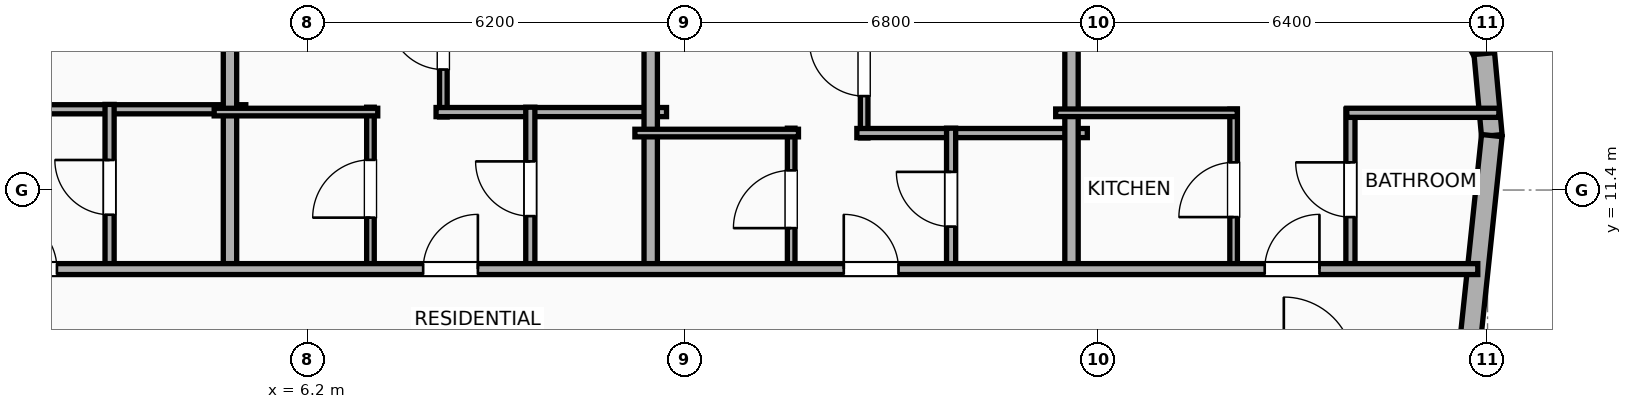
"""IFC4 building model, lengths in metres.
Left out: names, types, materials, properties, quantities, classifications, styles, units other than length and angle.
Written with IfcOpenShell. Run it as: python <this file> out.ifc"""

import sys

from ifc_helpers import new_model, si_unit, direction, frame, frame_2d, origin, place, context, subcontext, project, spatial, rectangle, extrude, element, fill, save


model = new_model("IFC4")
c1 = context("Model", 3, precision=1e-05, world=origin(), true_north=direction((0.0, 1.0)))
c2 = subcontext(c1, "Body", "Model", "MODEL_VIEW")
j1 = project(units=[si_unit("LENGTHUNIT", "METRE"), si_unit("PLANEANGLEUNIT", "RADIAN")], contexts=[c1])
p1 = place(None, origin())
s1 = spatial("IfcSite", under=j1, at=p1, CompositionType="ELEMENT")
p2 = place(p1, origin())
s2 = spatial("IfcBuilding", under=s1, at=p2, CompositionType="ELEMENT")
p3 = place(p2, frame((0.0, 0.0, 271.7)))
s3 = spatial("IfcBuildingStorey", under=s2, at=p3, CompositionType="ELEMENT", Elevation=271.7)
p4 = place(p3, frame((24.924, 14.827, 0.0), z_axis=(0.0, 0.0, 1.0), x_axis=(0.46567116636, -0.884957832228, 0.0)))
e1 = element("IfcWall", 1, at=p4, inside=s3, PredefinedType="ELEMENTEDWALL", context=c2, shape_type="SweptSolid", body=[
    extrude(rectangle(XDim=1.337, YDim=0.34, at=frame_2d((0.668, 0.0))), origin(), (0.0, 0.0, 1.0), 3.65),
])
p5 = place(p3, frame((25.546, 13.644, 0.0), z_axis=(0.0, 0.0, 1.0), x_axis=(0.091592370975, -0.995796584438, 0.0)))
e2 = element("IfcWall", 2, at=p5, inside=s3, PredefinedType="ELEMENTEDWALL", context=c2, shape_type="SweptSolid", body=[
    extrude(rectangle(XDim=1.354, YDim=0.34, at=frame_2d((0.677, 0.0))), origin(), (0.0, 0.0, 1.0), 3.65),
])
p6 = place(p3, frame((25.67, 12.296, 0.0), z_axis=(0.0, 0.0, 1.0), x_axis=(-0.104533282919, -0.994521388791, 0.0)))
e3 = element("IfcWall", 3, at=p6, inside=s3, PredefinedType="ELEMENTEDWALL", context=c2, shape_type="SweptSolid", body=[
    extrude(rectangle(XDim=30.366, YDim=0.34, at=frame_2d((15.183, 0.0))), origin(), (0.0, 0.0, 1.0), 3.65),
])
p7 = place(p6, frame((5.842, 0.0, 0.75)))
e4 = element("IfcOpeningElement", 4, at=p7, cuts=e3, PredefinedType="OPENING", context=c2, shape_type="SweptSolid", body=[
    extrude(rectangle(XDim=1.8, YDim=2.1, at=frame_2d((0.9, 1.05))), frame((0.0, 0.18, 0.0), z_axis=(0.0, -1.0, 0.0), x_axis=(1.0, 0.0, 0.0)), (0.0, 0.0, 1.0), 0.36),
])
p8 = place(p6, frame((23.525, 0.0, 0.75)))
e5 = element("IfcOpeningElement", 5, at=p8, cuts=e3, PredefinedType="OPENING", context=c2, shape_type="SweptSolid", body=[
    extrude(rectangle(XDim=1.8, YDim=2.1, at=frame_2d((0.9, 1.05))), frame((0.0, 0.18, 0.0), z_axis=(0.0, -1.0, 0.0), x_axis=(1.0, 0.0, 0.0)), (0.0, 0.0, 1.0), 0.36),
])
p9 = place(p6, frame((27.017, 0.0, 0.75)))
e6 = element("IfcOpeningElement", 6, at=p9, cuts=e3, PredefinedType="OPENING", context=c2, shape_type="SweptSolid", body=[
    extrude(rectangle(XDim=1.2, YDim=2.05, at=frame_2d((0.6, 1.025))), frame((0.0, 0.18, 0.0), z_axis=(0.0, -1.0, 0.0), x_axis=(1.0, 0.0, 0.0)), (0.0, 0.0, 1.0), 0.36),
])
p10 = place(p6, frame((17.829, 0.0, 0.75)))
e7 = element("IfcOpeningElement", 7, at=p10, cuts=e3, PredefinedType="OPENING", context=c2, shape_type="SweptSolid", body=[
    extrude(rectangle(XDim=1.2, YDim=2.05, at=frame_2d((0.6, 1.025))), frame((0.0, 0.18, 0.0), z_axis=(0.0, -1.0, 0.0), x_axis=(1.0, 0.0, 0.0)), (0.0, 0.0, 1.0), 0.36),
])
p11 = place(p3, frame((1.389, 12.728, 0.0), z_axis=(0.0, 0.0, 1.0), x_axis=(1.0, 0.0, 0.0)))
e8 = element("IfcWall", 8, at=p11, inside=s3, PredefinedType="PLUMBINGWALL", context=c2, shape_type="SweptSolid", body=[
    extrude(rectangle(XDim=3.79, YDim=0.15, at=frame_2d((1.895, 0.0))), origin(), (0.0, 0.0, 1.0), 3.65),
])
p12 = place(p3, frame((2.939, 10.08, 0.0), z_axis=(0.0, 0.0, 1.0), x_axis=(0.0, 1.0, 0.0)))
e9 = element("IfcWall", 9, at=p12, inside=s3, PredefinedType="PLUMBINGWALL", context=c2, shape_type="SweptSolid", body=[
    extrude(rectangle(XDim=2.728, YDim=0.15, at=frame_2d((1.364, 0.0))), origin(), (0.0, 0.0, 1.0), 3.65),
])
p13 = place(p12, frame((0.914, 0.0, 0.0)))
e10 = element("IfcOpeningElement", 10, at=p13, cuts=e9, PredefinedType="OPENING", context=c2, shape_type="SweptSolid", body=[
    extrude(rectangle(XDim=0.9, YDim=2.05, at=frame_2d((0.45, 1.025))), frame((0.0, 0.085, 0.0), z_axis=(0.0, -1.0, 0.0), x_axis=(1.0, 0.0, 0.0)), (0.0, 0.0, 1.0), 0.17),
])
p14 = place(p3, frame((4.919, 10.02, 0.0), z_axis=(0.0, 0.0, 1.0), x_axis=(0.0, 1.0, 0.0)))
e11 = element("IfcWall", 11, at=p14, inside=s3, PredefinedType="PARTITIONING", context=c2, shape_type="SweptSolid", body=[
    extrude(rectangle(XDim=7.922, YDim=0.22, at=frame_2d((3.961, 0.0))), origin(), (0.0, 0.0, 1.0), 3.65),
])
p15 = place(p3, frame((8.428, 12.602, 0.0), z_axis=(0.0, 0.0, 1.0), x_axis=(0.0, 1.0, 0.0)))
e12 = element("IfcWall", 12, at=p15, inside=s3, PredefinedType="PARTITIONING", context=c2, shape_type="SweptSolid", body=[
    extrude(rectangle(XDim=5.122, YDim=0.125, at=frame_2d((2.561, 0.0))), origin(), (0.0, 0.0, 1.0), 3.65),
])
p16 = place(p15, frame((0.779, 0.0, 0.0)))
e13 = element("IfcOpeningElement", 13, at=p16, cuts=e12, PredefinedType="OPENING", context=c2, shape_type="SweptSolid", body=[
    extrude(rectangle(XDim=0.9, YDim=2.05, at=frame_2d((0.45, 1.025))), frame((0.0, 0.073, 0.0), z_axis=(0.0, -1.0, 0.0), x_axis=(1.0, 0.0, 0.0)), (0.0, 0.0, 1.0), 0.145),
])
p17 = place(p3, frame((8.308, 12.682, 0.0), z_axis=(0.0, 0.0, 1.0), x_axis=(1.0, 0.0, 0.0)))
e14 = element("IfcWall", 14, at=p17, inside=s3, PredefinedType="PLUMBINGWALL", context=c2, shape_type="SweptSolid", body=[
    extrude(rectangle(XDim=3.79, YDim=0.15, at=frame_2d((1.895, 0.0))), origin(), (0.0, 0.0, 1.0), 3.65),
])
p18 = place(p3, frame((7.229, 10.08, 0.0), z_axis=(0.0, 0.0, 1.0), x_axis=(0.0, 1.0, 0.0)))
e15 = element("IfcWall", 15, at=p18, inside=s3, PredefinedType="PARTITIONING", context=c2, shape_type="SweptSolid", body=[
    extrude(rectangle(XDim=2.682, YDim=0.125, at=frame_2d((1.341, 0.0))), origin(), (0.0, 0.0, 1.0), 3.65),
])
p19 = place(p18, frame((0.866, 0.0, 0.0)))
e16 = element("IfcOpeningElement", 16, at=p19, cuts=e15, PredefinedType="OPENING", context=c2, shape_type="SweptSolid", body=[
    extrude(rectangle(XDim=0.95, YDim=2.05, at=frame_2d((0.475, 1.025))), frame((0.0, 0.073, 0.0), z_axis=(0.0, -1.0, 0.0), x_axis=(1.0, 0.0, 0.0)), (0.0, 0.0, 1.0), 0.145),
])
p20 = place(p3, frame((4.659, 12.682, 0.0), z_axis=(0.0, 0.0, 1.0), x_axis=(1.0, 0.0, 0.0)))
e17 = element("IfcWall", 17, at=p20, inside=s3, PredefinedType="PARTITIONING", context=c2, shape_type="SweptSolid", body=[
    extrude(rectangle(XDim=2.69, YDim=0.125, at=frame_2d((1.345, 0.0))), origin(), (0.0, 0.0, 1.0), 3.65),
])
p21 = place(p3, frame((9.858, 10.08, 0.0), z_axis=(0.0, 0.0, 1.0), x_axis=(0.0, 1.0, 0.0)))
e18 = element("IfcWall", 18, at=p21, inside=s3, PredefinedType="PLUMBINGWALL", context=c2, shape_type="SweptSolid", body=[
    extrude(rectangle(XDim=2.682, YDim=0.15, at=frame_2d((1.341, 0.0))), origin(), (0.0, 0.0, 1.0), 3.65),
])
p22 = place(p21, frame((0.891, 0.0, 0.0)))
e19 = element("IfcOpeningElement", 19, at=p22, cuts=e18, PredefinedType="OPENING", context=c2, shape_type="SweptSolid", body=[
    extrude(rectangle(XDim=0.9, YDim=2.05, at=frame_2d((0.45, 1.025))), frame((0.0, 0.085, 0.0), z_axis=(0.0, -1.0, 0.0), x_axis=(1.0, 0.0, 0.0)), (0.0, 0.0, 1.0), 0.17),
])
p23 = place(p3, frame((11.838, 10.02, 0.0), z_axis=(0.0, 0.0, 1.0), x_axis=(0.0, 1.0, 0.0)))
e20 = element("IfcWall", 20, at=p23, inside=s3, PredefinedType="PARTITIONING", context=c2, shape_type="SweptSolid", body=[
    extrude(rectangle(XDim=7.195, YDim=0.22, at=frame_2d((3.598, 0.0))), origin(), (0.0, 0.0, 1.0), 3.65),
])
p24 = place(p3, frame((15.348, 12.257, 0.0), z_axis=(0.0, 0.0, 1.0), x_axis=(0.0, 1.0, 0.0)))
e21 = element("IfcWall", 21, at=p24, inside=s3, PredefinedType="PARTITIONING", context=c2, shape_type="SweptSolid", body=[
    extrude(rectangle(XDim=4.74, YDim=0.125, at=frame_2d((2.37, 0.0))), origin(), (0.0, 0.0, 1.0), 3.65),
])
p25 = place(p24, frame((0.688, 0.0, 0.0)))
e22 = element("IfcOpeningElement", 22, at=p25, cuts=e21, PredefinedType="OPENING", context=c2, shape_type="SweptSolid", body=[
    extrude(rectangle(XDim=0.9, YDim=2.05, at=frame_2d((0.45, 1.025))), frame((0.0, 0.073, 0.0), z_axis=(0.0, -1.0, 0.0), x_axis=(1.0, 0.0, 0.0)), (0.0, 0.0, 1.0), 0.145),
])
p26 = place(p3, frame((15.228, 12.337, 0.0), z_axis=(0.0, 0.0, 1.0), x_axis=(1.0, 0.0, 0.0)))
e23 = element("IfcWall", 23, at=p26, inside=s3, PredefinedType="PLUMBINGWALL", context=c2, shape_type="SweptSolid", body=[
    extrude(rectangle(XDim=3.79, YDim=0.15, at=frame_2d((1.895, 0.0))), origin(), (0.0, 0.0, 1.0), 3.65),
])
p27 = place(p3, frame((14.148, 10.08, 0.0), z_axis=(0.0, 0.0, 1.0), x_axis=(0.0, 1.0, 0.0)))
e24 = element("IfcWall", 24, at=p27, inside=s3, PredefinedType="PARTITIONING", context=c2, shape_type="SweptSolid", body=[
    extrude(rectangle(XDim=2.337, YDim=0.125, at=frame_2d((1.168, 0.0))), origin(), (0.0, 0.0, 1.0), 3.65),
])
p28 = place(p27, frame((0.694, 0.0, 0.0)))
e25 = element("IfcOpeningElement", 25, at=p28, cuts=e24, PredefinedType="OPENING", context=c2, shape_type="SweptSolid", body=[
    extrude(rectangle(XDim=0.95, YDim=2.05, at=frame_2d((0.475, 1.025))), frame((0.0, 0.073, 0.0), z_axis=(0.0, -1.0, 0.0), x_axis=(1.0, 0.0, 0.0)), (0.0, 0.0, 1.0), 0.145),
])
p29 = place(p3, frame((11.578, 12.337, 0.0), z_axis=(0.0, 0.0, 1.0), x_axis=(1.0, 0.0, 0.0)))
e26 = element("IfcWall", 26, at=p29, inside=s3, PredefinedType="PARTITIONING", context=c2, shape_type="SweptSolid", body=[
    extrude(rectangle(XDim=2.69, YDim=0.125, at=frame_2d((1.345, 0.0))), origin(), (0.0, 0.0, 1.0), 3.65),
])
p30 = place(p3, frame((16.778, 10.08, 0.0), z_axis=(0.0, 0.0, 1.0), x_axis=(0.0, 1.0, 0.0)))
e27 = element("IfcWall", 27, at=p30, inside=s3, PredefinedType="PLUMBINGWALL", context=c2, shape_type="SweptSolid", body=[
    extrude(rectangle(XDim=2.337, YDim=0.15, at=frame_2d((1.168, 0.0))), origin(), (0.0, 0.0, 1.0), 3.65),
])
p31 = place(p30, frame((0.719, 0.0, 0.0)))
e28 = element("IfcOpeningElement", 28, at=p31, cuts=e27, PredefinedType="OPENING", context=c2, shape_type="SweptSolid", body=[
    extrude(rectangle(XDim=0.9, YDim=2.05, at=frame_2d((0.45, 1.025))), frame((0.0, 0.085, 0.0), z_axis=(0.0, -1.0, 0.0), x_axis=(1.0, 0.0, 0.0)), (0.0, 0.0, 1.0), 0.17),
])
p32 = place(p3, frame((18.758, 10.02, 0.0), z_axis=(0.0, 0.0, 1.0), x_axis=(0.0, 1.0, 0.0)))
e29 = element("IfcWall", 29, at=p32, inside=s3, PredefinedType="PARTITIONING", context=c2, shape_type="SweptSolid", body=[
    extrude(rectangle(XDim=6.468, YDim=0.22, at=frame_2d((3.234, 0.0))), origin(), (0.0, 0.0, 1.0), 3.65),
])
p33 = place(p3, frame((21.424, 10.08, 0.0), z_axis=(0.0, 0.0, 1.0), x_axis=(0.0, 1.0, 0.0)))
e30 = element("IfcWall", 30, at=p33, inside=s3, PredefinedType="PARTITIONING", context=c2, shape_type="SweptSolid", body=[
    extrude(rectangle(XDim=2.65, YDim=0.125, at=frame_2d((1.325, 0.0))), origin(), (0.0, 0.0, 1.0), 3.09),
])
p34 = place(p33, frame((0.875, 0.0, 0.0)))
e31 = element("IfcOpeningElement", 31, at=p34, cuts=e30, PredefinedType="OPENING", context=c2, shape_type="SweptSolid", body=[
    extrude(rectangle(XDim=0.9, YDim=2.05, at=frame_2d((0.45, 1.025))), frame((0.0, 0.073, 0.0), z_axis=(0.0, -1.0, 0.0), x_axis=(1.0, 0.0, 0.0)), (0.0, 0.0, 1.0), 0.145),
])
p35 = place(p3, frame((23.345, 10.08, 0.0), z_axis=(0.0, 0.0, 1.0), x_axis=(0.0, 1.0, 0.0)))
e32 = element("IfcWall", 32, at=p35, inside=s3, PredefinedType="PLUMBINGWALL", context=c2, shape_type="SweptSolid", body=[
    extrude(rectangle(XDim=2.65, YDim=0.15, at=frame_2d((1.325, 0.0))), origin(), (0.0, 0.0, 1.0), 3.65),
])
p36 = place(p35, frame((0.875, 0.0, 0.0)))
e33 = element("IfcOpeningElement", 33, at=p36, cuts=e32, PredefinedType="OPENING", context=c2, shape_type="SweptSolid", body=[
    extrude(rectangle(XDim=0.9, YDim=2.05, at=frame_2d((0.45, 1.025))), frame((0.0, 0.085, 0.0), z_axis=(0.0, -1.0, 0.0), x_axis=(1.0, 0.0, 0.0)), (0.0, 0.0, 1.0), 0.17),
])
p37 = place(p3, frame((18.498, 12.67, 0.0), z_axis=(0.0, 0.0, 1.0), x_axis=(1.0, 0.0, 0.0)))
e34 = element("IfcWall", 34, at=p37, inside=s3, PredefinedType="PARTITIONING", context=c2, shape_type="SweptSolid", body=[
    extrude(rectangle(XDim=2.986, YDim=0.125, at=frame_2d((1.493, 0.0))), origin(), (0.0, 0.0, 1.0), 3.65),
])
p38 = place(p3, frame((23.285, 12.67, 0.0), z_axis=(0.0, 0.0, 1.0), x_axis=(1.0, 0.0, 0.0)))
e35 = element("IfcWall", 35, at=p38, inside=s3, PredefinedType="PLUMBINGWALL", context=c2, shape_type="SweptSolid", body=[
    extrude(rectangle(XDim=2.501, YDim=0.15, at=frame_2d((1.251, 0.0))), origin(), (0.0, 0.0, 1.0), 3.65),
])
p39 = place(p3, frame((-28.516, 10.1, 0.0), z_axis=(0.0, 0.0, 1.0), x_axis=(1.0, 0.0, 0.0)))
e36 = element("IfcWall", 36, at=p39, inside=s3, PredefinedType="PARTITIONING", context=c2, shape_type="SweptSolid", body=[
    extrude(rectangle(XDim=53.955, YDim=0.18, at=frame_2d((26.978, 0.0))), origin(), (0.0, 0.0, 1.0), 3.65),
])
p40 = place(p39, frame((2.998, 0.0, 0.0)))
e37 = element("IfcOpeningElement", 37, at=p40, cuts=e36, PredefinedType="OPENING", context=c2, shape_type="SweptSolid", body=[
    extrude(rectangle(XDim=0.9, YDim=2.05, at=frame_2d((0.45, 1.025))), frame((0.0, 0.1, 0.0), z_axis=(0.0, -1.0, 0.0), x_axis=(1.0, 0.0, 0.0)), (0.0, 0.0, 1.0), 0.2),
])
p41 = place(p39, frame((9.656, 0.0, 0.0)))
e38 = element("IfcOpeningElement", 38, at=p41, cuts=e36, PredefinedType="OPENING", context=c2, shape_type="SweptSolid", body=[
    extrude(rectangle(XDim=0.9, YDim=2.05, at=frame_2d((0.45, 1.025))), frame((0.0, 0.1, 0.0), z_axis=(0.0, -1.0, 0.0), x_axis=(1.0, 0.0, 0.0)), (0.0, 0.0, 1.0), 0.2),
])
p42 = place(p39, frame((16.287, 0.0, 0.0)))
e39 = element("IfcOpeningElement", 39, at=p42, cuts=e36, PredefinedType="OPENING", context=c2, shape_type="SweptSolid", body=[
    extrude(rectangle(XDim=0.9, YDim=2.05, at=frame_2d((0.45, 1.025))), frame((0.0, 0.1, 0.0), z_axis=(0.0, -1.0, 0.0), x_axis=(1.0, 0.0, 0.0)), (0.0, 0.0, 1.0), 0.2),
])
p43 = place(p39, frame((22.918, 0.0, 0.0)))
e40 = element("IfcOpeningElement", 40, at=p43, cuts=e36, PredefinedType="OPENING", context=c2, shape_type="SweptSolid", body=[
    extrude(rectangle(XDim=0.9, YDim=2.05, at=frame_2d((0.45, 1.025))), frame((0.0, 0.1, 0.0), z_axis=(0.0, -1.0, 0.0), x_axis=(1.0, 0.0, 0.0)), (0.0, 0.0, 1.0), 0.2),
])
p44 = place(p39, frame((29.689, 0.0, 0.0)))
e41 = element("IfcOpeningElement", 41, at=p44, cuts=e36, PredefinedType="OPENING", context=c2, shape_type="SweptSolid", body=[
    extrude(rectangle(XDim=0.9, YDim=2.05, at=frame_2d((0.45, 1.025))), frame((0.0, 0.1, 0.0), z_axis=(0.0, -1.0, 0.0), x_axis=(1.0, 0.0, 0.0)), (0.0, 0.0, 1.0), 0.2),
])
p45 = place(p39, frame((36.612, 0.0, 0.0)))
e42 = element("IfcOpeningElement", 42, at=p45, cuts=e36, PredefinedType="OPENING", context=c2, shape_type="SweptSolid", body=[
    extrude(rectangle(XDim=0.9, YDim=2.05, at=frame_2d((0.45, 1.025))), frame((0.0, 0.1, 0.0), z_axis=(0.0, -1.0, 0.0), x_axis=(1.0, 0.0, 0.0)), (0.0, 0.0, 1.0), 0.2),
])
p46 = place(p39, frame((43.529, 0.0, 0.0)))
e43 = element("IfcOpeningElement", 43, at=p46, cuts=e36, PredefinedType="OPENING", context=c2, shape_type="SweptSolid", body=[
    extrude(rectangle(XDim=0.9, YDim=2.05, at=frame_2d((0.45, 1.025))), frame((0.0, 0.1, 0.0), z_axis=(0.0, -1.0, 0.0), x_axis=(1.0, 0.0, 0.0)), (0.0, 0.0, 1.0), 0.2),
])
p47 = place(p39, frame((50.452, 0.0, 0.0)))
e44 = element("IfcOpeningElement", 44, at=p47, cuts=e36, PredefinedType="OPENING", context=c2, shape_type="SweptSolid", body=[
    extrude(rectangle(XDim=0.9, YDim=2.05, at=frame_2d((0.45, 1.025))), frame((0.0, 0.1, 0.0), z_axis=(0.0, -1.0, 0.0), x_axis=(1.0, 0.0, 0.0)), (0.0, 0.0, 1.0), 0.2),
])
p48 = place(p13, origin())
e45 = element("IfcDoor", 45, at=p48, inside=s3, OperationType="SINGLE_SWING_RIGHT", PredefinedType="DOOR", context=c2, shape_type="SweptSolid", body=[
    extrude(rectangle(XDim=0.9, YDim=2.05, at=frame_2d((0.45, 1.025))), frame((0.0, 0.025, 0.0), z_axis=(0.0, -1.0, 0.0), x_axis=(1.0, 0.0, 0.0)), (0.0, 0.0, 1.0), 0.05),
])
fill(e10, e45)
p49 = place(p16, origin())
e46 = element("IfcDoor", 46, at=p49, inside=s3, OperationType="SINGLE_SWING_RIGHT", PredefinedType="DOOR", context=c2, shape_type="SweptSolid", body=[
    extrude(rectangle(XDim=0.9, YDim=2.05, at=frame_2d((0.45, 1.025))), frame((0.0, 0.025, 0.0), z_axis=(0.0, -1.0, 0.0), x_axis=(1.0, 0.0, 0.0)), (0.0, 0.0, 1.0), 0.05),
])
fill(e13, e46)
p50 = place(p19, origin())
e47 = element("IfcDoor", 47, at=p50, inside=s3, OperationType="SINGLE_SWING_LEFT", PredefinedType="DOOR", context=c2, shape_type="SweptSolid", body=[
    extrude(rectangle(XDim=0.95, YDim=2.05, at=frame_2d((0.475, 1.025))), frame((0.0, 0.025, 0.0), z_axis=(0.0, -1.0, 0.0), x_axis=(1.0, 0.0, 0.0)), (0.0, 0.0, 1.0), 0.05),
])
fill(e16, e47)
p51 = place(p22, origin())
e48 = element("IfcDoor", 48, at=p51, inside=s3, OperationType="SINGLE_SWING_RIGHT", PredefinedType="DOOR", context=c2, shape_type="SweptSolid", body=[
    extrude(rectangle(XDim=0.9, YDim=2.05, at=frame_2d((0.45, 1.025))), frame((0.0, 0.025, 0.0), z_axis=(0.0, -1.0, 0.0), x_axis=(1.0, 0.0, 0.0)), (0.0, 0.0, 1.0), 0.05),
])
fill(e19, e48)
p52 = place(p25, origin())
e49 = element("IfcDoor", 49, at=p52, inside=s3, OperationType="SINGLE_SWING_RIGHT", PredefinedType="DOOR", context=c2, shape_type="SweptSolid", body=[
    extrude(rectangle(XDim=0.9, YDim=2.05, at=frame_2d((0.45, 1.025))), frame((0.0, 0.025, 0.0), z_axis=(0.0, -1.0, 0.0), x_axis=(1.0, 0.0, 0.0)), (0.0, 0.0, 1.0), 0.05),
])
fill(e22, e49)
p53 = place(p28, origin())
e50 = element("IfcDoor", 50, at=p53, inside=s3, OperationType="SINGLE_SWING_LEFT", PredefinedType="DOOR", context=c2, shape_type="SweptSolid", body=[
    extrude(rectangle(XDim=0.95, YDim=2.05, at=frame_2d((0.475, 1.025))), frame((0.0, 0.025, 0.0), z_axis=(0.0, -1.0, 0.0), x_axis=(1.0, 0.0, 0.0)), (0.0, 0.0, 1.0), 0.05),
])
fill(e25, e50)
p54 = place(p31, origin())
e51 = element("IfcDoor", 51, at=p54, inside=s3, OperationType="SINGLE_SWING_RIGHT", PredefinedType="DOOR", context=c2, shape_type="SweptSolid", body=[
    extrude(rectangle(XDim=0.9, YDim=2.05, at=frame_2d((0.45, 1.025))), frame((0.0, 0.025, 0.0), z_axis=(0.0, -1.0, 0.0), x_axis=(1.0, 0.0, 0.0)), (0.0, 0.0, 1.0), 0.05),
])
fill(e28, e51)
p55 = place(p34, origin())
e52 = element("IfcDoor", 52, at=p55, inside=s3, OperationType="SINGLE_SWING_LEFT", PredefinedType="DOOR", context=c2, shape_type="SweptSolid", body=[
    extrude(rectangle(XDim=0.9, YDim=2.05, at=frame_2d((0.45, 1.025))), frame((0.0, 0.025, 0.0), z_axis=(0.0, -1.0, 0.0), x_axis=(1.0, 0.0, 0.0)), (0.0, 0.0, 1.0), 0.05),
])
fill(e31, e52)
p56 = place(p36, origin())
e53 = element("IfcDoor", 53, at=p56, inside=s3, OperationType="SINGLE_SWING_RIGHT", PredefinedType="DOOR", context=c2, shape_type="SweptSolid", body=[
    extrude(rectangle(XDim=0.9, YDim=2.05, at=frame_2d((0.45, 1.025))), frame((0.0, 0.025, 0.0), z_axis=(0.0, -1.0, 0.0), x_axis=(1.0, 0.0, 0.0)), (0.0, 0.0, 1.0), 0.05),
])
fill(e33, e53)
p57 = place(p44, origin())
e54 = element("IfcDoor", 54, at=p57, inside=s3, OperationType="SINGLE_SWING_LEFT", PredefinedType="DOOR", context=c2, shape_type="SweptSolid", body=[
    extrude(rectangle(XDim=0.9, YDim=2.05, at=frame_2d((0.45, 1.025))), frame((0.0, 0.025, 0.0), z_axis=(0.0, -1.0, 0.0), x_axis=(1.0, 0.0, 0.0)), (0.0, 0.0, 1.0), 0.05),
])
fill(e41, e54)
p58 = place(p45, origin())
e55 = element("IfcDoor", 55, at=p58, inside=s3, OperationType="SINGLE_SWING_RIGHT", PredefinedType="DOOR", context=c2, shape_type="SweptSolid", body=[
    extrude(rectangle(XDim=0.9, YDim=2.05, at=frame_2d((0.45, 1.025))), frame((0.0, 0.025, 0.0), z_axis=(0.0, -1.0, 0.0), x_axis=(1.0, 0.0, 0.0)), (0.0, 0.0, 1.0), 0.05),
])
fill(e42, e55)
p59 = place(p46, origin())
e56 = element("IfcDoor", 56, at=p59, inside=s3, OperationType="SINGLE_SWING_LEFT", PredefinedType="DOOR", context=c2, shape_type="SweptSolid", body=[
    extrude(rectangle(XDim=0.9, YDim=2.05, at=frame_2d((0.45, 1.025))), frame((0.0, 0.025, 0.0), z_axis=(0.0, -1.0, 0.0), x_axis=(1.0, 0.0, 0.0)), (0.0, 0.0, 1.0), 0.05),
])
fill(e43, e56)
p60 = place(p47, origin())
e57 = element("IfcDoor", 57, at=p60, inside=s3, OperationType="SINGLE_SWING_RIGHT", PredefinedType="DOOR", context=c2, shape_type="SweptSolid", body=[
    extrude(rectangle(XDim=0.9, YDim=2.05, at=frame_2d((0.45, 1.025))), frame((0.0, 0.025, 0.0), z_axis=(0.0, -1.0, 0.0), x_axis=(1.0, 0.0, 0.0)), (0.0, 0.0, 1.0), 0.05),
])
fill(e44, e57)
save(model, sys.argv[1])
